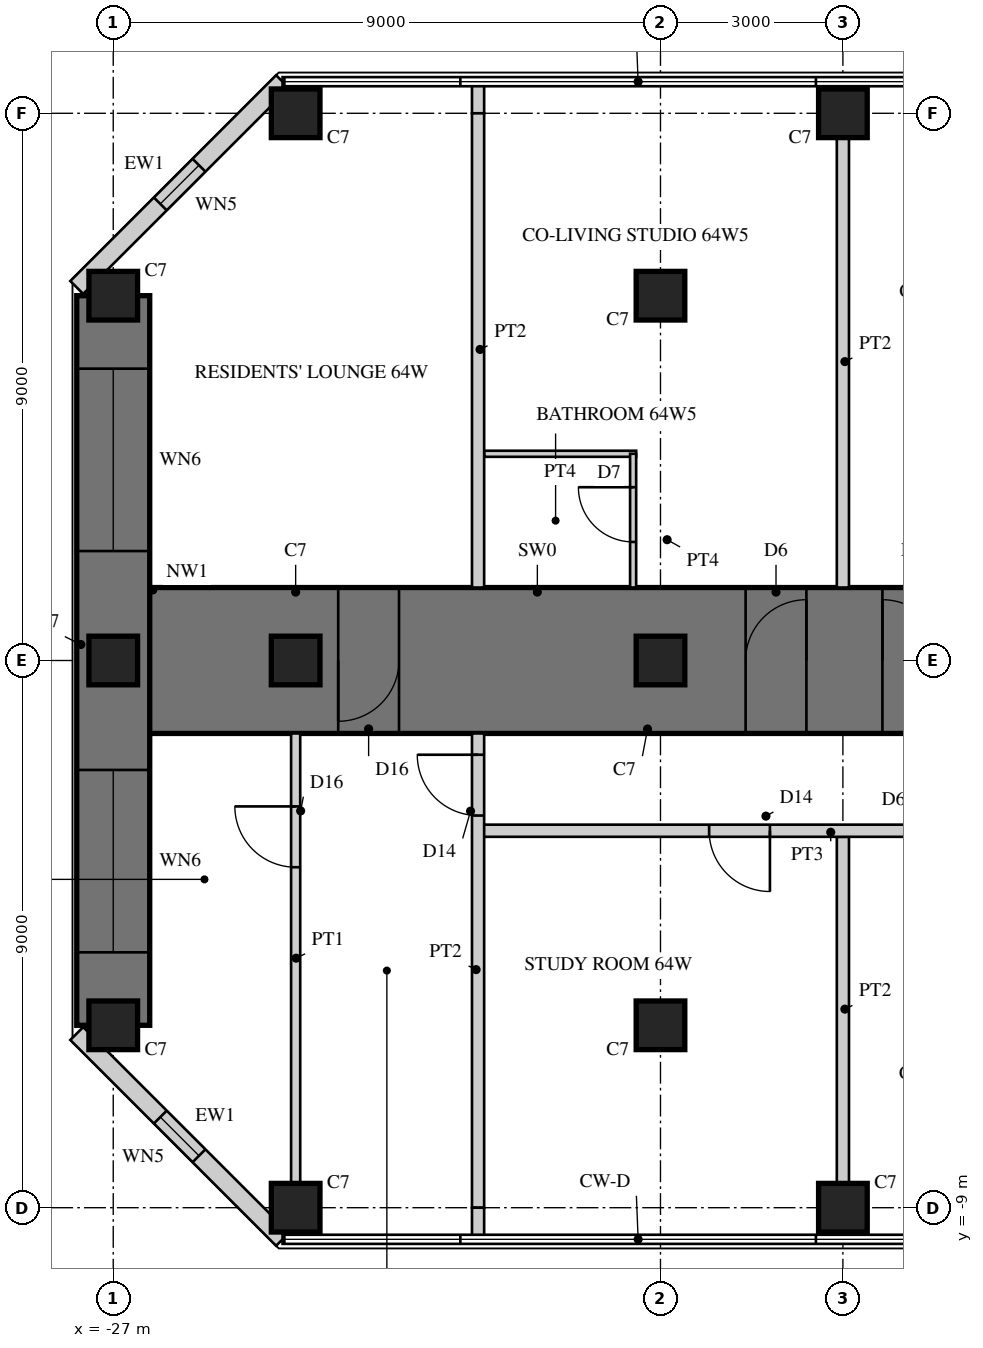
"""IFC4 building model, lengths in metres.
Left out: names, types, materials, properties, quantities, classifications, styles, units other than length and angle.
Written with IfcOpenShell. Run it as: python <this file> out.ifc"""

import sys

from ifc_helpers import new_model, si_unit, direction, frame, frame_2d, origin, origin_2d, place, context, subcontext, project, spatial, rectangle, hollow_rectangle, extrude, element, fill, save


model = new_model("IFC4")
c1 = context("Model", 3, precision=1e-05, world=origin(), true_north=direction((0.0, 1.0)))
c2 = subcontext(c1, "Body", "Model", "MODEL_VIEW")
j1 = project(units=[si_unit("LENGTHUNIT", "METRE"), si_unit("PLANEANGLEUNIT", "RADIAN")], contexts=[c1])
p1 = place(None, origin())
s1 = spatial("IfcSite", under=j1, at=p1, CompositionType="ELEMENT")
p2 = place(p1, origin())
s2 = spatial("IfcBuilding", under=s1, at=p2, CompositionType="ELEMENT")
p3 = place(p2, frame((0.0, 0.0, 249.3)))
s3 = spatial("IfcBuildingStorey", under=s2, at=p3, CompositionType="ELEMENT", Elevation=249.3)
p4 = place(p3, frame((-13.05, 0.0, 0.0), z_axis=(0.0, 0.0, 1.0), x_axis=(-1.0, 0.0, 0.0)))
e1 = element("IfcWall", 1, at=p4, inside=s3, PredefinedType="SHEAR", context=c2, shape_type="SweptSolid", body=[
    extrude(rectangle(XDim=13.95, YDim=2.4, at=frame_2d((6.975, 0.0))), origin(), (0.0, 0.0, 1.0), 3.4),
])
p5 = place(p4, frame((0.3, 0.0, 0.0)))
e2 = element("IfcOpeningElement", 2, at=p5, cuts=e1, PredefinedType="OPENING", context=c2, shape_type="SweptSolid", body=[
    extrude(rectangle(XDim=1.0, YDim=2.15, at=frame_2d((0.5, 1.075))), frame((0.0, 1.21, 0.0), z_axis=(0.0, -1.0, 0.0), x_axis=(1.0, 0.0, 0.0)), (0.0, 0.0, 1.0), 2.42),
])
p6 = place(p4, frame((2.55, 0.0, 0.0)))
e3 = element("IfcOpeningElement", 3, at=p6, cuts=e1, PredefinedType="OPENING", context=c2, shape_type="SweptSolid", body=[
    extrude(rectangle(XDim=1.0, YDim=2.15, at=frame_2d((0.5, 1.075))), frame((0.0, 1.21, 0.0), z_axis=(0.0, -1.0, 0.0), x_axis=(1.0, 0.0, 0.0)), (0.0, 0.0, 1.0), 2.42),
])
p7 = place(p4, frame((9.25, 0.0, 0.0)))
e4 = element("IfcOpeningElement", 4, at=p7, cuts=e1, PredefinedType="OPENING", context=c2, shape_type="SweptSolid", body=[
    extrude(rectangle(XDim=1.0, YDim=2.0, at=frame_2d((0.5, 1.0))), frame((0.0, 1.21, 0.0), z_axis=(0.0, -1.0, 0.0), x_axis=(1.0, 0.0, 0.0)), (0.0, 0.0, 1.0), 2.42),
])
p8 = place(p3, frame((-27.0, 6.0, 0.0), z_axis=(0.0, 0.0, 1.0), x_axis=(0.0, -1.0, 0.0)))
e5 = element("IfcWall", 5, at=p8, inside=s3, PredefinedType="SHEAR", context=c2, shape_type="SweptSolid", body=[
    extrude(rectangle(XDim=12.0, YDim=1.2, at=frame_2d((6.0, 0.0))), origin(), (0.0, 0.0, 1.0), 3.4),
])
p9 = place(p8, frame((1.2, 0.0, 0.6)))
e6 = element("IfcOpeningElement", 6, at=p9, cuts=e5, PredefinedType="OPENING", context=c2, shape_type="SweptSolid", body=[
    extrude(rectangle(XDim=3.0, YDim=2.4, at=frame_2d((1.5, 1.2))), frame((0.0, 0.61, 0.0), z_axis=(0.0, -1.0, 0.0), x_axis=(1.0, 0.0, 0.0)), (0.0, 0.0, 1.0), 1.22),
])
p10 = place(p8, frame((7.8, 0.0, 0.6)))
e7 = element("IfcOpeningElement", 7, at=p10, cuts=e5, PredefinedType="OPENING", context=c2, shape_type="SweptSolid", body=[
    extrude(rectangle(XDim=3.0, YDim=2.4, at=frame_2d((1.5, 1.2))), frame((0.0, 0.61, 0.0), z_axis=(0.0, -1.0, 0.0), x_axis=(1.0, 0.0, 0.0)), (0.0, 0.0, 1.0), 1.22),
])
for number, where, z_axis, x_axis in (
    (8, (-15.0, 9.0, 0.0), (0.0, 0.0, 1.0), (1.0, 0.0, 0.0)),
    (9, (-24.0, 9.0, 0.0), (0.0, 0.0, 1.0), (1.0, 0.0, 0.0)),
    (10, (-15.0, -9.0, 0.0), (0.0, 0.0, 1.0), (1.0, 0.0, 0.0)),
    (11, (-24.0, -9.0, 0.0), (0.0, 0.0, 1.0), (1.0, 0.0, 0.0)),
    (12, (-27.0, 6.0, 0.0), (0.0, 0.0, 1.0), (1.0, 0.0, 0.0)),
    (13, (-27.0, 0.0, 0.0), (0.0, 0.0, 1.0), (1.0, 0.0, 0.0)),
    (14, (-27.0, -6.0, 0.0), (0.0, 0.0, 1.0), (1.0, 0.0, 0.0)),
    (15, (-18.0, 6.0, 0.0), (0.0, 0.0, 1.0), (1.0, 0.0, 0.0)),
    (16, (-18.0, 0.0, 0.0), (0.0, 0.0, 1.0), (1.0, 0.0, 0.0)),
    (17, (-18.0, -6.0, 0.0), (0.0, 0.0, 1.0), (1.0, 0.0, 0.0)),
    (18, (-24.0, 0.0, 0.0), (0.0, 0.0, 1.0), (1.0, 0.0, 0.0)),
):
    element("IfcColumn", number, at=place(p3, frame(where, z_axis=z_axis, x_axis=x_axis)), inside=s3, PredefinedType="COLUMN", context=c2, shape_type="SweptSolid", body=[
        extrude(rectangle(XDim=0.8, YDim=0.8, at=origin_2d()), origin(), (0.0, 0.0, 1.0), 3.4),
    ])
p11 = place(p3, frame((-24.215, 9.52, 0.0), z_axis=(0.0, 0.0, 1.0), x_axis=(-0.707132283189, -0.707081278264, 0.0)))
e19 = element("IfcWall", 19, at=p11, inside=s3, PredefinedType="SOLIDWALL", context=c2, shape_type="SweptSolid", body=[
    extrude(rectangle(XDim=4.787, YDim=0.3, at=frame_2d((2.393, 0.0))), origin(), (0.0, 0.0, 1.0), 3.15),
])
p12 = place(p11, frame((1.943, 0.0, 0.3)))
e20 = element("IfcOpeningElement", 20, at=p12, cuts=e19, PredefinedType="OPENING", context=c2, shape_type="SweptSolid", body=[
    extrude(rectangle(XDim=0.9, YDim=2.4, at=frame_2d((0.45, 1.2))), frame((0.0, 0.16, 0.0), z_axis=(0.0, -1.0, 0.0), x_axis=(1.0, 0.0, 0.0)), (0.0, 0.0, 1.0), 0.32),
])
p13 = place(p3, frame((-27.6, -6.135, 0.0), z_axis=(0.0, 0.0, 1.0), x_axis=(0.707132283189, -0.707081278264, 0.0)))
e21 = element("IfcWall", 21, at=p13, inside=s3, PredefinedType="SOLIDWALL", context=c2, shape_type="SweptSolid", body=[
    extrude(rectangle(XDim=4.787, YDim=0.3, at=frame_2d((2.393, 0.0))), origin(), (0.0, 0.0, 1.0), 3.15),
])
p14 = place(p13, frame((1.943, 0.0, 0.3)))
e22 = element("IfcOpeningElement", 22, at=p14, cuts=e21, PredefinedType="OPENING", context=c2, shape_type="SweptSolid", body=[
    extrude(rectangle(XDim=0.9, YDim=2.4, at=frame_2d((0.45, 1.2))), frame((0.0, 0.16, 0.0), z_axis=(0.0, -1.0, 0.0), x_axis=(1.0, 0.0, 0.0)), (0.0, 0.0, 1.0), 0.32),
])
p15 = place(p3, frame((-15.0, -2.9, 0.0), z_axis=(0.0, 0.0, 1.0), x_axis=(0.0, -1.0, 0.0)))
e23 = element("IfcWall", 23, at=p15, inside=s3, PredefinedType="SOLIDWALL", context=c2, shape_type="SweptSolid", body=[
    extrude(rectangle(XDim=5.7, YDim=0.2, at=frame_2d((2.85, 0.0))), origin(), (0.0, 0.0, 1.0), 2.1),
])
p16 = place(p3, frame((-15.0, 8.6, 0.0), z_axis=(0.0, 0.0, 1.0), x_axis=(0.0, -1.0, 0.0)))
e24 = element("IfcWall", 24, at=p16, inside=s3, PredefinedType="SOLIDWALL", context=c2, shape_type="SweptSolid", body=[
    extrude(rectangle(XDim=7.4, YDim=0.2, at=frame_2d((3.7, 0.0))), origin(), (0.0, 0.0, 1.0), 2.1),
])
p17 = place(p3, frame((-18.4, 3.4, 0.0), z_axis=(0.0, 0.0, 1.0), x_axis=(-1.0, 0.0, 0.0)))
e25 = element("IfcWall", 25, at=p17, inside=s3, PredefinedType="PARTITIONING", context=c2, shape_type="SweptSolid", body=[
    extrude(rectangle(XDim=2.5, YDim=0.1, at=frame_2d((1.25, 0.0))), origin(), (0.0, 0.0, 1.0), 3.15),
])
p18 = place(p3, frame((-18.45, 3.4, 0.0), z_axis=(0.0, 0.0, 1.0), x_axis=(0.0, -1.0, 0.0)))
e26 = element("IfcWall", 26, at=p18, inside=s3, PredefinedType="PARTITIONING", context=c2, shape_type="SweptSolid", body=[
    extrude(rectangle(XDim=2.2, YDim=0.1, at=frame_2d((1.1, 0.0))), origin(), (0.0, 0.0, 1.0), 3.15),
])
p19 = place(p18, frame((0.55, 0.0, 0.0)))
e27 = element("IfcOpeningElement", 27, at=p19, cuts=e26, PredefinedType="OPENING", context=c2, shape_type="SweptSolid", body=[
    extrude(rectangle(XDim=0.9, YDim=2.1, at=frame_2d((0.45, 1.05))), frame((0.0, 0.06, 0.0), z_axis=(0.0, -1.0, 0.0), x_axis=(1.0, 0.0, 0.0)), (0.0, 0.0, 1.0), 0.12),
])
p20 = place(p3, frame((-9.4, -2.8, 0.0), z_axis=(0.0, 0.0, 1.0), x_axis=(-1.0, 0.0, 0.0)))
e28 = element("IfcWall", 28, at=p20, inside=s3, PredefinedType="SOLIDWALL", context=c2, shape_type="SweptSolid", body=[
    extrude(rectangle(XDim=11.6, YDim=0.2, at=frame_2d((5.8, 0.0))), origin(), (0.0, 0.0, 1.0), 3.15),
])
p21 = place(p20, frame((3.4, 0.0, 0.0)))
e29 = element("IfcOpeningElement", 29, at=p21, cuts=e28, PredefinedType="OPENING", context=c2, shape_type="SweptSolid", body=[
    extrude(rectangle(XDim=1.0, YDim=2.15, at=frame_2d((0.5, 1.075))), frame((0.0, 0.11, 0.0), z_axis=(0.0, -1.0, 0.0), x_axis=(1.0, 0.0, 0.0)), (0.0, 0.0, 1.0), 0.22),
])
p22 = place(p20, frame((6.8, 0.0, 0.0)))
e30 = element("IfcOpeningElement", 30, at=p22, cuts=e28, PredefinedType="OPENING", context=c2, shape_type="SweptSolid", body=[
    extrude(rectangle(XDim=1.0, YDim=2.2, at=frame_2d((0.5, 1.1))), frame((0.0, 0.11, 0.0), z_axis=(0.0, -1.0, 0.0), x_axis=(1.0, 0.0, 0.0)), (0.0, 0.0, 1.0), 0.22),
])
p23 = place(p3, frame((-24.0, -1.2, 0.0), z_axis=(0.0, 0.0, 1.0), x_axis=(0.0, -1.0, 0.0)))
e31 = element("IfcWall", 31, at=p23, inside=s3, PredefinedType="PARTITIONING", context=c2, shape_type="SweptSolid", body=[
    extrude(rectangle(XDim=7.4, YDim=0.15, at=frame_2d((3.7, 0.0))), origin(), (0.0, 0.0, 1.0), 2.1),
])
p24 = place(p23, frame((1.2, 0.0, 0.0)))
e32 = element("IfcOpeningElement", 32, at=p24, cuts=e31, PredefinedType="OPENING", context=c2, shape_type="SweptSolid", body=[
    extrude(rectangle(XDim=1.0, YDim=2.0, at=frame_2d((0.5, 1.0))), frame((0.0, 0.085, 0.0), z_axis=(0.0, -1.0, 0.0), x_axis=(1.0, 0.0, 0.0)), (0.0, 0.0, 1.0), 0.17),
])
p25 = place(p3, frame((-21.0, 9.48, 0.0), z_axis=(0.0, 0.0, 1.0), x_axis=(0.0, -1.0, 0.0)))
e33 = element("IfcWall", 33, at=p25, inside=s3, PredefinedType="SOLIDWALL", context=c2, shape_type="SweptSolid", body=[
    extrude(rectangle(XDim=0.48, YDim=0.2, at=frame_2d((0.24, 0.0))), origin(), (0.0, 0.0, 1.0), 3.15),
])
p26 = place(p3, frame((-21.0, 9.0, 0.0), z_axis=(0.0, 0.0, 1.0), x_axis=(0.0, -1.0, 0.0)))
e34 = element("IfcWall", 34, at=p26, inside=s3, PredefinedType="SOLIDWALL", context=c2, shape_type="SweptSolid", body=[
    extrude(rectangle(XDim=7.8, YDim=0.2, at=frame_2d((3.9, 0.0))), origin(), (0.0, 0.0, 1.0), 2.3),
])
p27 = place(p3, frame((-21.0, -1.2, 0.0), z_axis=(0.0, 0.0, 1.0), x_axis=(0.0, -1.0, 0.0)))
e35 = element("IfcWall", 35, at=p27, inside=s3, PredefinedType="SOLIDWALL", context=c2, shape_type="SweptSolid", body=[
    extrude(rectangle(XDim=7.8, YDim=0.2, at=frame_2d((3.9, 0.0))), origin(), (0.0, 0.0, 1.0), 2.3),
])
p28 = place(p27, frame((0.35, 0.0, 0.0)))
e36 = element("IfcOpeningElement", 36, at=p28, cuts=e35, PredefinedType="OPENING", context=c2, shape_type="SweptSolid", body=[
    extrude(rectangle(XDim=1.0, YDim=2.2, at=frame_2d((0.5, 1.1))), frame((0.0, 0.11, 0.0), z_axis=(0.0, -1.0, 0.0), x_axis=(1.0, 0.0, 0.0)), (0.0, 0.0, 1.0), 0.22),
])
p29 = place(p3, frame((-21.0, -9.0, 0.0), z_axis=(0.0, 0.0, 1.0), x_axis=(0.0, -1.0, 0.0)))
e37 = element("IfcWall", 37, at=p29, inside=s3, PredefinedType="SOLIDWALL", context=c2, shape_type="SweptSolid", body=[
    extrude(rectangle(XDim=0.48, YDim=0.2, at=frame_2d((0.24, 0.0))), origin(), (0.0, 0.0, 1.0), 3.15),
])
p30 = place(p12, origin())
e38 = element("IfcWindow", 38, at=p30, inside=s3, PartitioningType="SINGLE_PANEL", PredefinedType="WINDOW", context=c2, shape_type="SweptSolid", body=[
    extrude(hollow_rectangle(XDim=0.9, YDim=2.4, WallThickness=0.06, at=frame_2d((0.45, 1.2))), frame((0.0, 0.03, 0.0), z_axis=(0.0, -1.0, 0.0), x_axis=(1.0, 0.0, 0.0)), (0.0, 0.0, 1.0), 0.06),
    extrude(rectangle(XDim=0.779, YDim=2.279, at=frame_2d((0.45, 1.2))), frame((0.0, 0.03, 0.0), z_axis=(0.0, -1.0, 0.0), x_axis=(1.0, 0.0, 0.0)), (0.0, 0.0, 1.0), 0.06),
])
fill(e20, e38)
p31 = place(p9, origin())
e39 = element("IfcWindow", 39, at=p31, inside=s3, PartitioningType="SINGLE_PANEL", PredefinedType="WINDOW", context=c2, shape_type="SweptSolid", body=[
    extrude(hollow_rectangle(XDim=3.0, YDim=2.4, WallThickness=0.06, at=frame_2d((1.5, 1.2))), frame((0.0, 0.03, 0.0), z_axis=(0.0, -1.0, 0.0), x_axis=(1.0, 0.0, 0.0)), (0.0, 0.0, 1.0), 0.06),
    extrude(rectangle(XDim=2.879, YDim=2.279, at=frame_2d((1.5, 1.2))), frame((0.0, 0.03, 0.0), z_axis=(0.0, -1.0, 0.0), x_axis=(1.0, 0.0, 0.0)), (0.0, 0.0, 1.0), 0.06),
])
fill(e6, e39)
p32 = place(p10, origin())
e40 = element("IfcWindow", 40, at=p32, inside=s3, PartitioningType="SINGLE_PANEL", PredefinedType="WINDOW", context=c2, shape_type="SweptSolid", body=[
    extrude(hollow_rectangle(XDim=3.0, YDim=2.4, WallThickness=0.06, at=frame_2d((1.5, 1.2))), frame((0.0, 0.03, 0.0), z_axis=(0.0, -1.0, 0.0), x_axis=(1.0, 0.0, 0.0)), (0.0, 0.0, 1.0), 0.06),
    extrude(rectangle(XDim=2.879, YDim=2.279, at=frame_2d((1.5, 1.2))), frame((0.0, 0.03, 0.0), z_axis=(0.0, -1.0, 0.0), x_axis=(1.0, 0.0, 0.0)), (0.0, 0.0, 1.0), 0.06),
])
fill(e7, e40)
p33 = place(p14, origin())
e41 = element("IfcWindow", 41, at=p33, inside=s3, PartitioningType="SINGLE_PANEL", PredefinedType="WINDOW", context=c2, shape_type="SweptSolid", body=[
    extrude(hollow_rectangle(XDim=0.9, YDim=2.4, WallThickness=0.06, at=frame_2d((0.45, 1.2))), frame((0.0, 0.03, 0.0), z_axis=(0.0, -1.0, 0.0), x_axis=(1.0, 0.0, 0.0)), (0.0, 0.0, 1.0), 0.06),
    extrude(rectangle(XDim=0.779, YDim=2.279, at=frame_2d((0.45, 1.2))), frame((0.0, 0.03, 0.0), z_axis=(0.0, -1.0, 0.0), x_axis=(1.0, 0.0, 0.0)), (0.0, 0.0, 1.0), 0.06),
])
fill(e22, e41)
p34 = place(p19, frame((0.9, 0.0, 0.0), z_axis=(0.0, 0.0, 1.0), x_axis=(-1.0, 0.0, 0.0)))
e42 = element("IfcDoor", 42, at=p34, inside=s3, OperationType="SINGLE_SWING_RIGHT", PredefinedType="DOOR", context=c2, shape_type="SweptSolid", body=[
    extrude(rectangle(XDim=0.9, YDim=2.1, at=frame_2d((0.45, 1.05))), frame((0.0, 0.025, 0.0), z_axis=(0.0, -1.0, 0.0), x_axis=(1.0, 0.0, 0.0)), (0.0, 0.0, 1.0), 0.05),
])
fill(e27, e42)
p35 = place(p22, origin())
e43 = element("IfcDoor", 43, at=p35, inside=s3, OperationType="SINGLE_SWING_LEFT", PredefinedType="DOOR", context=c2, shape_type="SweptSolid", body=[
    extrude(rectangle(XDim=1.0, YDim=2.2, at=frame_2d((0.5, 1.1))), frame((0.0, 0.025, 0.0), z_axis=(0.0, -1.0, 0.0), x_axis=(1.0, 0.0, 0.0)), (0.0, 0.0, 1.0), 0.05),
])
fill(e30, e43)
p36 = place(p24, frame((1.0, 0.0, 0.0), z_axis=(0.0, 0.0, 1.0), x_axis=(-1.0, 0.0, 0.0)))
e44 = element("IfcDoor", 44, at=p36, inside=s3, OperationType="SINGLE_SWING_RIGHT", PredefinedType="DOOR", context=c2, shape_type="SweptSolid", body=[
    extrude(rectangle(XDim=1.0, YDim=2.0, at=frame_2d((0.5, 1.0))), frame((0.0, 0.025, 0.0), z_axis=(0.0, -1.0, 0.0), x_axis=(1.0, 0.0, 0.0)), (0.0, 0.0, 1.0), 0.05),
])
fill(e32, e44)
p37 = place(p28, frame((1.0, 0.0, 0.0), z_axis=(0.0, 0.0, 1.0), x_axis=(-1.0, 0.0, 0.0)))
e45 = element("IfcDoor", 45, at=p37, inside=s3, OperationType="SINGLE_SWING_RIGHT", PredefinedType="DOOR", context=c2, shape_type="SweptSolid", body=[
    extrude(rectangle(XDim=1.0, YDim=2.2, at=frame_2d((0.5, 1.1))), frame((0.0, 0.025, 0.0), z_axis=(0.0, -1.0, 0.0), x_axis=(1.0, 0.0, 0.0)), (0.0, 0.0, 1.0), 0.05),
])
fill(e36, e45)
p38 = place(p5, frame((1.0, 0.0, 0.0), z_axis=(0.0, 0.0, 1.0), x_axis=(-1.0, 0.0, 0.0)))
e46 = element("IfcDoor", 46, at=p38, inside=s3, OperationType="SINGLE_SWING_LEFT", PredefinedType="DOOR", context=c2, shape_type="SweptSolid", body=[
    extrude(rectangle(XDim=1.0, YDim=2.15, at=frame_2d((0.5, 1.075))), frame((0.0, 0.025, 0.0), z_axis=(0.0, -1.0, 0.0), x_axis=(1.0, 0.0, 0.0)), (0.0, 0.0, 1.0), 0.05),
])
fill(e2, e46)
p39 = place(p6, frame((1.0, 0.0, 0.0), z_axis=(0.0, 0.0, 1.0), x_axis=(-1.0, 0.0, 0.0)))
e47 = element("IfcDoor", 47, at=p39, inside=s3, OperationType="SINGLE_SWING_RIGHT", PredefinedType="DOOR", context=c2, shape_type="SweptSolid", body=[
    extrude(rectangle(XDim=1.0, YDim=2.15, at=frame_2d((0.5, 1.075))), frame((0.0, 0.025, 0.0), z_axis=(0.0, -1.0, 0.0), x_axis=(1.0, 0.0, 0.0)), (0.0, 0.0, 1.0), 0.05),
])
fill(e3, e47)
p40 = place(p7, origin())
e48 = element("IfcDoor", 48, at=p40, inside=s3, OperationType="SINGLE_SWING_RIGHT", PredefinedType="DOOR", context=c2, shape_type="SweptSolid", body=[
    extrude(rectangle(XDim=1.0, YDim=2.0, at=frame_2d((0.5, 1.0))), frame((0.0, 0.025, 0.0), z_axis=(0.0, -1.0, 0.0), x_axis=(1.0, 0.0, 0.0)), (0.0, 0.0, 1.0), 0.05),
])
fill(e4, e48)
save(model, sys.argv[1])
